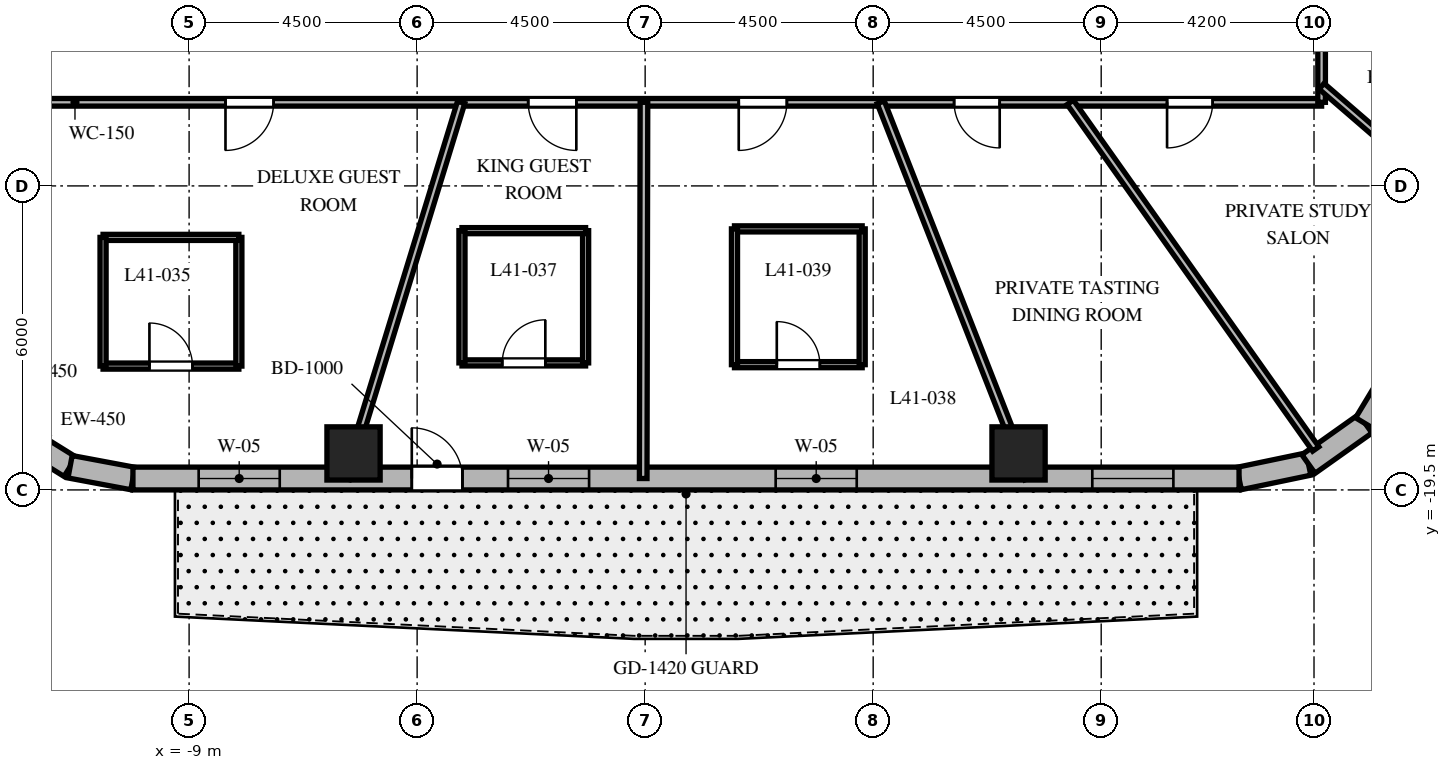
"""IFC4 building model, lengths in metres.
Left out: names, types, materials, properties, quantities, classifications, styles, units other than length and angle.
Written with IfcOpenShell. Run it as: python <this file> out.ifc"""

import sys

from ifc_helpers import new_model, si_unit, direction, frame, frame_2d, origin, origin_2d, place, context, subcontext, project, spatial, rectangle, extrude, element, fill, save


model = new_model("IFC4")
c1 = context("Model", 3, precision=1e-05, world=origin(), true_north=direction((0.0, 1.0)))
c2 = subcontext(c1, "Body", "Model", "MODEL_VIEW")
j1 = project(units=[si_unit("LENGTHUNIT", "METRE"), si_unit("PLANEANGLEUNIT", "RADIAN")], contexts=[c1])
p1 = place(None, origin())
s1 = spatial("IfcSite", under=j1, at=p1, CompositionType="ELEMENT")
p2 = place(p1, origin())
s2 = spatial("IfcBuilding", under=s1, at=p2, CompositionType="ELEMENT")
p3 = place(p2, frame((0.0, 0.0, 166.5)))
s3 = spatial("IfcBuildingStorey", under=s2, at=p3, CompositionType="ELEMENT", Elevation=166.5)
for number, where, z_axis, x_axis in (
    (1, (-5.755, -18.78, 0.0), (0.0, 0.0, 1.0), (1.0, 0.0, 0.0)),
    (2, (7.369, -18.78, 0.0), (0.0, 0.0, 1.0), (1.0, 0.0, 0.0)),
):
    element("IfcColumn", number, at=place(p3, frame(where, z_axis=z_axis, x_axis=x_axis)), inside=s3, PredefinedType="COLUMN", context=c2, shape_type="SweptSolid", body=[
        extrude(rectangle(XDim=1.05, YDim=1.05, at=origin_2d()), origin(), (0.0, 0.0, 1.0), 3.7),
    ])
p4 = place(p3, frame((-12.403, -18.389, 0.0), z_axis=(0.0, 0.0, 1.0), x_axis=(0.849795170926, -0.527113049991, 0.0)))
e3 = element("IfcWall", 3, at=p4, inside=s3, PredefinedType="SOLIDWALL", context=c2, shape_type="SweptSolid", body=[
    extrude(rectangle(XDim=1.241, YDim=0.45, at=frame_2d((0.62, 0.0))), origin(), (0.0, 0.0, 1.0), 3.38),
])
p5 = place(p3, frame((-11.349, -19.043, 0.0), z_axis=(0.0, 0.0, 1.0), x_axis=(0.982931267051, -0.183973161772, 0.0)))
e4 = element("IfcWall", 4, at=p5, inside=s3, PredefinedType="SOLIDWALL", context=c2, shape_type="SweptSolid", body=[
    extrude(rectangle(XDim=1.262, YDim=0.45, at=frame_2d((0.631, 0.0))), origin(), (0.0, 0.0, 1.0), 3.38),
])
p6 = place(p3, frame((11.72, -19.275, 0.0), z_axis=(0.0, 0.0, 1.0), x_axis=(0.97893106758, 0.204191001093, 0.0)))
e5 = element("IfcWall", 5, at=p6, inside=s3, PredefinedType="SOLIDWALL", context=c2, shape_type="SweptSolid", body=[
    extrude(rectangle(XDim=1.4, YDim=0.45, at=frame_2d((0.7, 0.0))), origin(), (0.0, 0.0, 1.0), 3.38),
])
p7 = place(p3, frame((13.091, -18.989, 0.0), z_axis=(0.0, 0.0, 1.0), x_axis=(0.815574637848, 0.578651890258, 0.0)))
e6 = element("IfcWall", 6, at=p7, inside=s3, PredefinedType="SOLIDWALL", context=c2, shape_type="SweptSolid", body=[
    extrude(rectangle(XDim=1.377, YDim=0.45, at=frame_2d((0.688, 0.0))), origin(), (0.0, 0.0, 1.0), 3.38),
])
p8 = place(p3, frame((14.214, -18.192, 0.0), z_axis=(0.0, 0.0, 1.0), x_axis=(0.516340945502, 0.856383108193, 0.0)))
e7 = element("IfcWall", 7, at=p8, inside=s3, PredefinedType="SOLIDWALL", context=c2, shape_type="SweptSolid", body=[
    extrude(rectangle(XDim=1.4, YDim=0.45, at=frame_2d((0.7, 0.0))), origin(), (0.0, 0.0, 1.0), 3.38),
])
p9 = place(p3, frame((-10.108, -19.275, 0.0), z_axis=(0.0, 0.0, 1.0), x_axis=(1.0, 0.0, 0.0)))
e8 = element("IfcWall", 8, at=p9, inside=s3, PredefinedType="SOLIDWALL", context=c2, shape_type="SweptSolid", body=[
    extrude(rectangle(XDim=21.829, YDim=0.45, at=frame_2d((10.915, 0.0))), origin(), (0.0, 0.0, 1.0), 3.38),
])
p10 = place(p9, frame((5.503, 0.0, 0.0)))
e9 = element("IfcOpeningElement", 9, at=p10, cuts=e8, PredefinedType="OPENING", context=c2, shape_type="SweptSolid", body=[
    extrude(rectangle(XDim=1.0, YDim=2.15, at=frame_2d((0.5, 1.075))), frame((0.0, 0.235, 0.0), z_axis=(0.0, -1.0, 0.0), x_axis=(1.0, 0.0, 0.0)), (0.0, 0.0, 1.0), 0.47),
])
p11 = place(p9, frame((1.297, 0.0, 0.8)))
e10 = element("IfcOpeningElement", 10, at=p11, cuts=e8, PredefinedType="OPENING", context=c2, shape_type="SweptSolid", body=[
    extrude(rectangle(XDim=1.6, YDim=1.75, at=frame_2d((0.8, 0.875))), frame((0.0, 0.235, 0.0), z_axis=(0.0, -1.0, 0.0), x_axis=(1.0, 0.0, 0.0)), (0.0, 0.0, 1.0), 0.47),
])
p12 = place(p9, frame((7.402, 0.0, 0.8)))
e11 = element("IfcOpeningElement", 11, at=p12, cuts=e8, PredefinedType="OPENING", context=c2, shape_type="SweptSolid", body=[
    extrude(rectangle(XDim=1.6, YDim=1.75, at=frame_2d((0.8, 0.875))), frame((0.0, 0.235, 0.0), z_axis=(0.0, -1.0, 0.0), x_axis=(1.0, 0.0, 0.0)), (0.0, 0.0, 1.0), 0.47),
])
p13 = place(p9, frame((12.684, 0.0, 0.8)))
e12 = element("IfcOpeningElement", 12, at=p13, cuts=e8, PredefinedType="OPENING", context=c2, shape_type="SweptSolid", body=[
    extrude(rectangle(XDim=1.6, YDim=1.75, at=frame_2d((0.8, 0.875))), frame((0.0, 0.235, 0.0), z_axis=(0.0, -1.0, 0.0), x_axis=(1.0, 0.0, 0.0)), (0.0, 0.0, 1.0), 0.47),
])
p14 = place(p9, frame((18.933, 0.0, 0.8)))
e13 = element("IfcOpeningElement", 13, at=p14, cuts=e8, PredefinedType="OPENING", context=c2, shape_type="SweptSolid", body=[
    extrude(rectangle(XDim=1.6, YDim=1.75, at=frame_2d((0.8, 0.875))), frame((0.0, 0.235, 0.0), z_axis=(0.0, -1.0, 0.0), x_axis=(1.0, 0.0, 0.0)), (0.0, 0.0, 1.0), 0.47),
])
p15 = place(p3, frame((13.35, -11.85, 0.0), z_axis=(0.0, 0.0, 1.0), x_axis=(-1.0, 0.0, 0.0)))
e14 = element("IfcWall", 14, at=p15, inside=s3, PredefinedType="PARTITIONING", context=c2, shape_type="SweptSolid", body=[
    extrude(rectangle(XDim=26.7, YDim=0.15, at=frame_2d((13.35, 0.0))), origin(), (0.0, 0.0, 1.0), 2.82),
])
p16 = place(p15, frame((20.682, 0.0, 0.0)))
e15 = element("IfcOpeningElement", 15, at=p16, cuts=e14, PredefinedType="OPENING", context=c2, shape_type="SweptSolid", body=[
    extrude(rectangle(XDim=0.95, YDim=2.03, at=frame_2d((0.475, 1.015))), frame((0.0, 0.085, 0.0), z_axis=(0.0, -1.0, 0.0), x_axis=(1.0, 0.0, 0.0)), (0.0, 0.0, 1.0), 0.17),
])
p17 = place(p15, frame((14.708, 0.0, 0.0)))
e16 = element("IfcOpeningElement", 16, at=p17, cuts=e14, PredefinedType="OPENING", context=c2, shape_type="SweptSolid", body=[
    extrude(rectangle(XDim=0.95, YDim=2.03, at=frame_2d((0.475, 1.015))), frame((0.0, 0.085, 0.0), z_axis=(0.0, -1.0, 0.0), x_axis=(1.0, 0.0, 0.0)), (0.0, 0.0, 1.0), 0.17),
])
p18 = place(p15, frame((10.553, 0.0, 0.0)))
e17 = element("IfcOpeningElement", 17, at=p18, cuts=e14, PredefinedType="OPENING", context=c2, shape_type="SweptSolid", body=[
    extrude(rectangle(XDim=0.95, YDim=2.03, at=frame_2d((0.475, 1.015))), frame((0.0, 0.085, 0.0), z_axis=(0.0, -1.0, 0.0), x_axis=(1.0, 0.0, 0.0)), (0.0, 0.0, 1.0), 0.17),
])
p19 = place(p15, frame((6.353, 0.0, 0.0)))
e18 = element("IfcOpeningElement", 18, at=p19, cuts=e14, PredefinedType="OPENING", context=c2, shape_type="SweptSolid", body=[
    extrude(rectangle(XDim=0.9, YDim=2.03, at=frame_2d((0.45, 1.015))), frame((0.0, 0.085, 0.0), z_axis=(0.0, -1.0, 0.0), x_axis=(1.0, 0.0, 0.0)), (0.0, 0.0, 1.0), 0.17),
])
p20 = place(p15, frame((2.15, 0.0, 0.0)))
e19 = element("IfcOpeningElement", 19, at=p20, cuts=e14, PredefinedType="OPENING", context=c2, shape_type="SweptSolid", body=[
    extrude(rectangle(XDim=0.9, YDim=2.03, at=frame_2d((0.45, 1.015))), frame((0.0, 0.085, 0.0), z_axis=(0.0, -1.0, 0.0), x_axis=(1.0, 0.0, 0.0)), (0.0, 0.0, 1.0), 0.17),
])
p21 = place(p3, frame((13.35, 11.85, 0.0), z_axis=(0.0, 0.0, 1.0), x_axis=(0.0, -1.0, 0.0)))
e20 = element("IfcWall", 20, at=p21, inside=s3, PredefinedType="PARTITIONING", context=c2, shape_type="SweptSolid", body=[
    extrude(rectangle(XDim=23.7, YDim=0.15, at=frame_2d((11.85, 0.0))), origin(), (0.0, 0.0, 1.0), 2.82),
])
p22 = place(p21, frame((5.652, 0.0, 0.0)))
e21 = element("IfcOpeningElement", 21, at=p22, cuts=e20, PredefinedType="OPENING", context=c2, shape_type="SweptSolid", body=[
    extrude(rectangle(XDim=0.95, YDim=2.03, at=frame_2d((0.475, 1.015))), frame((0.0, 0.085, 0.0), z_axis=(0.0, -1.0, 0.0), x_axis=(1.0, 0.0, 0.0)), (0.0, 0.0, 1.0), 0.17),
])
p23 = place(p21, frame((1.721, 0.0, 0.0)))
e22 = element("IfcOpeningElement", 22, at=p23, cuts=e20, PredefinedType="OPENING", context=c2, shape_type="SweptSolid", body=[
    extrude(rectangle(XDim=0.9, YDim=2.03, at=frame_2d((0.45, 1.015))), frame((0.0, 0.085, 0.0), z_axis=(0.0, -1.0, 0.0), x_axis=(1.0, 0.0, 0.0)), (0.0, 0.0, 1.0), 0.17),
])
p24 = place(p21, frame((18.389, 0.0, 0.0)))
e23 = element("IfcOpeningElement", 23, at=p24, cuts=e20, PredefinedType="OPENING", context=c2, shape_type="SweptSolid", body=[
    extrude(rectangle(XDim=0.95, YDim=2.03, at=frame_2d((0.475, 1.015))), frame((0.0, 0.085, 0.0), z_axis=(0.0, -1.0, 0.0), x_axis=(1.0, 0.0, 0.0)), (0.0, 0.0, 1.0), 0.17),
])
p25 = place(p21, frame((10.751, 0.0, 0.0)))
e24 = element("IfcOpeningElement", 24, at=p25, cuts=e20, PredefinedType="OPENING", context=c2, shape_type="SweptSolid", body=[
    extrude(rectangle(XDim=0.95, YDim=2.03, at=frame_2d((0.475, 1.015))), frame((0.0, 0.085, 0.0), z_axis=(0.0, -1.0, 0.0), x_axis=(1.0, 0.0, 0.0)), (0.0, 0.0, 1.0), 0.17),
])
p26 = place(p3, frame((-3.631, -11.85, 0.0), z_axis=(0.0, 0.0, 1.0), x_axis=(-0.293007573338, -0.956110120209, 0.0)))
e25 = element("IfcWall", 25, at=p26, inside=s3, PredefinedType="PARTITIONING", context=c2, shape_type="SweptSolid", body=[
    extrude(rectangle(XDim=7.766, YDim=0.15, at=frame_2d((3.883, 0.0))), origin(), (0.0, 0.0, 1.0), 2.62),
])
p27 = place(p3, frame((-0.024, -11.85, 0.0), z_axis=(0.0, 0.0, 1.0), x_axis=(-0.001972901592, -0.999998053828, 0.0)))
e26 = element("IfcWall", 26, at=p27, inside=s3, PredefinedType="PARTITIONING", context=c2, shape_type="SweptSolid", body=[
    extrude(rectangle(XDim=7.425, YDim=0.15, at=frame_2d((3.712, 0.0))), origin(), (0.0, 0.0, 1.0), 2.62),
])
p28 = place(p3, frame((4.65, -11.85, 0.0), z_axis=(0.0, 0.0, 1.0), x_axis=(0.365265947993, -0.930903210456, 0.0)))
e27 = element("IfcWall", 27, at=p28, inside=s3, PredefinedType="PARTITIONING", context=c2, shape_type="SweptSolid", body=[
    extrude(rectangle(XDim=7.976, YDim=0.15, at=frame_2d((3.988, 0.0))), origin(), (0.0, 0.0, 1.0), 2.62),
])
p29 = place(p3, frame((8.39, -11.85, 0.0), z_axis=(0.0, 0.0, 1.0), x_axis=(0.577877530264, -0.816123495566, 0.0)))
e28 = element("IfcWall", 28, at=p29, inside=s3, PredefinedType="PARTITIONING", context=c2, shape_type="SweptSolid", body=[
    extrude(rectangle(XDim=8.382, YDim=0.15, at=frame_2d((4.191, 0.0))), origin(), (0.0, 0.0, 1.0), 2.62),
])
p30 = place(p3, frame((13.35, -11.533, 0.0), z_axis=(0.0, 0.0, 1.0), x_axis=(0.756711647314, -0.65374879183, 0.0)))
e29 = element("IfcWall", 29, at=p30, inside=s3, PredefinedType="PARTITIONING", context=c2, shape_type="SweptSolid", body=[
    extrude(rectangle(XDim=3.55, YDim=0.15, at=frame_2d((1.775, 0.0))), origin(), (0.0, 0.0, 1.0), 2.62),
])
p31 = place(p3, frame((-10.698, -17.056, 0.0), z_axis=(0.0, 0.0, 1.0), x_axis=(1.0, 0.0, 0.0)))
e30 = element("IfcWall", 30, at=p31, inside=s3, PredefinedType="PARTITIONING", context=c2, shape_type="SweptSolid", body=[
    extrude(rectangle(XDim=2.68, YDim=0.12, at=frame_2d((1.34, 0.0))), origin(), (0.0, 0.0, 1.0), 2.62),
])
p32 = place(p31, frame((0.915, 0.0, 0.0)))
e31 = element("IfcOpeningElement", 31, at=p32, cuts=e30, PredefinedType="OPENING", context=c2, shape_type="SweptSolid", body=[
    extrude(rectangle(XDim=0.85, YDim=2.03, at=frame_2d((0.425, 1.015))), frame((0.0, 0.07, 0.0), z_axis=(0.0, -1.0, 0.0), x_axis=(1.0, 0.0, 0.0)), (0.0, 0.0, 1.0), 0.14),
])
p33 = place(p3, frame((-8.018, -17.056, 0.0), z_axis=(0.0, 0.0, 1.0), x_axis=(0.0, 1.0, 0.0)))
e32 = element("IfcWall", 32, at=p33, inside=s3, PredefinedType="PARTITIONING", context=c2, shape_type="SweptSolid", body=[
    extrude(rectangle(XDim=2.54, YDim=0.12, at=frame_2d((1.27, 0.0))), origin(), (0.0, 0.0, 1.0), 3.38),
])
p34 = place(p3, frame((-8.018, -14.516, 0.0), z_axis=(0.0, 0.0, 1.0), x_axis=(-1.0, 0.0, 0.0)))
e33 = element("IfcWall", 33, at=p34, inside=s3, PredefinedType="PARTITIONING", context=c2, shape_type="SweptSolid", body=[
    extrude(rectangle(XDim=2.68, YDim=0.12, at=frame_2d((1.34, 0.0))), origin(), (0.0, 0.0, 1.0), 3.38),
])
p35 = place(p3, frame((-10.698, -14.516, 0.0), z_axis=(0.0, 0.0, 1.0), x_axis=(0.0, -1.0, 0.0)))
e34 = element("IfcWall", 34, at=p35, inside=s3, PredefinedType="PARTITIONING", context=c2, shape_type="SweptSolid", body=[
    extrude(rectangle(XDim=2.54, YDim=0.12, at=frame_2d((1.27, 0.0))), origin(), (0.0, 0.0, 1.0), 2.62),
])
p36 = place(p3, frame((-3.615, -16.993, 0.0), z_axis=(0.0, 0.0, 1.0), x_axis=(1.0, 0.0, 0.0)))
e35 = element("IfcWall", 35, at=p36, inside=s3, PredefinedType="PARTITIONING", context=c2, shape_type="SweptSolid", body=[
    extrude(rectangle(XDim=2.44, YDim=0.12, at=frame_2d((1.22, 0.0))), origin(), (0.0, 0.0, 1.0), 3.38),
])
p37 = place(p36, frame((0.795, 0.0, 0.0)))
e36 = element("IfcOpeningElement", 36, at=p37, cuts=e35, PredefinedType="OPENING", context=c2, shape_type="SweptSolid", body=[
    extrude(rectangle(XDim=0.85, YDim=2.03, at=frame_2d((0.425, 1.015))), frame((0.0, 0.07, 0.0), z_axis=(0.0, -1.0, 0.0), x_axis=(1.0, 0.0, 0.0)), (0.0, 0.0, 1.0), 0.14),
])
p38 = place(p3, frame((-1.175, -16.993, 0.0), z_axis=(0.0, 0.0, 1.0), x_axis=(0.0, 1.0, 0.0)))
e37 = element("IfcWall", 37, at=p38, inside=s3, PredefinedType="PARTITIONING", context=c2, shape_type="SweptSolid", body=[
    extrude(rectangle(XDim=2.61, YDim=0.12, at=frame_2d((1.305, 0.0))), origin(), (0.0, 0.0, 1.0), 2.82),
])
p39 = place(p3, frame((-1.175, -14.383, 0.0), z_axis=(0.0, 0.0, 1.0), x_axis=(-1.0, 0.0, 0.0)))
e38 = element("IfcWall", 38, at=p39, inside=s3, PredefinedType="PARTITIONING", context=c2, shape_type="SweptSolid", body=[
    extrude(rectangle(XDim=2.44, YDim=0.12, at=frame_2d((1.22, 0.0))), origin(), (0.0, 0.0, 1.0), 3.38),
])
p40 = place(p3, frame((-3.615, -14.383, 0.0), z_axis=(0.0, 0.0, 1.0), x_axis=(0.0, -1.0, 0.0)))
e39 = element("IfcWall", 39, at=p40, inside=s3, PredefinedType="PARTITIONING", context=c2, shape_type="SweptSolid", body=[
    extrude(rectangle(XDim=2.61, YDim=0.12, at=frame_2d((1.305, 0.0))), origin(), (0.0, 0.0, 1.0), 2.82),
])
p41 = place(p3, frame((1.763, -17.028, 0.0), z_axis=(0.0, 0.0, 1.0), x_axis=(1.0, 0.0, 0.0)))
e40 = element("IfcWall", 40, at=p41, inside=s3, PredefinedType="PARTITIONING", context=c2, shape_type="SweptSolid", body=[
    extrude(rectangle(XDim=2.52, YDim=0.12, at=frame_2d((1.26, 0.0))), origin(), (0.0, 0.0, 1.0), 3.38),
])
p42 = place(p41, frame((0.835, 0.0, 0.0)))
e41 = element("IfcOpeningElement", 41, at=p42, cuts=e40, PredefinedType="OPENING", context=c2, shape_type="SweptSolid", body=[
    extrude(rectangle(XDim=0.85, YDim=2.03, at=frame_2d((0.425, 1.015))), frame((0.0, 0.07, 0.0), z_axis=(0.0, -1.0, 0.0), x_axis=(1.0, 0.0, 0.0)), (0.0, 0.0, 1.0), 0.14),
])
p43 = place(p3, frame((4.283, -17.028, 0.0), z_axis=(0.0, 0.0, 1.0), x_axis=(0.0, 1.0, 0.0)))
e42 = element("IfcWall", 42, at=p43, inside=s3, PredefinedType="PARTITIONING", context=c2, shape_type="SweptSolid", body=[
    extrude(rectangle(XDim=2.68, YDim=0.12, at=frame_2d((1.34, 0.0))), origin(), (0.0, 0.0, 1.0), 2.82),
])
p44 = place(p3, frame((4.283, -14.348, 0.0), z_axis=(0.0, 0.0, 1.0), x_axis=(-1.0, 0.0, 0.0)))
e43 = element("IfcWall", 43, at=p44, inside=s3, PredefinedType="PARTITIONING", context=c2, shape_type="SweptSolid", body=[
    extrude(rectangle(XDim=2.52, YDim=0.12, at=frame_2d((1.26, 0.0))), origin(), (0.0, 0.0, 1.0), 3.38),
])
p45 = place(p3, frame((1.763, -14.348, 0.0), z_axis=(0.0, 0.0, 1.0), x_axis=(0.0, -1.0, 0.0)))
e44 = element("IfcWall", 44, at=p45, inside=s3, PredefinedType="PARTITIONING", context=c2, shape_type="SweptSolid", body=[
    extrude(rectangle(XDim=2.68, YDim=0.12, at=frame_2d((1.34, 0.0))), origin(), (0.0, 0.0, 1.0), 2.82),
])
p46 = place(p10, origin())
e45 = element("IfcDoor", 45, at=p46, inside=s3, OperationType="SINGLE_SWING_LEFT", PredefinedType="DOOR", context=c2, shape_type="SweptSolid", body=[
    extrude(rectangle(XDim=1.0, YDim=2.15, at=frame_2d((0.5, 1.075))), frame((0.0, 0.025, 0.0), z_axis=(0.0, -1.0, 0.0), x_axis=(1.0, 0.0, 0.0)), (0.0, 0.0, 1.0), 0.05),
])
fill(e9, e45)
p47 = place(p11, origin())
e46 = element("IfcWindow", 46, at=p47, inside=s3, PartitioningType="SINGLE_PANEL", PredefinedType="WINDOW", context=c2, shape_type="SweptSolid", body=[
    extrude(rectangle(XDim=1.6, YDim=1.75, at=frame_2d((0.8, 0.875))), frame((0.0, 0.03, 0.0), z_axis=(0.0, -1.0, 0.0), x_axis=(1.0, 0.0, 0.0)), (0.0, 0.0, 1.0), 0.06),
])
fill(e10, e46)
p48 = place(p12, origin())
e47 = element("IfcWindow", 47, at=p48, inside=s3, PartitioningType="SINGLE_PANEL", PredefinedType="WINDOW", context=c2, shape_type="SweptSolid", body=[
    extrude(rectangle(XDim=1.6, YDim=1.75, at=frame_2d((0.8, 0.875))), frame((0.0, 0.03, 0.0), z_axis=(0.0, -1.0, 0.0), x_axis=(1.0, 0.0, 0.0)), (0.0, 0.0, 1.0), 0.06),
])
fill(e11, e47)
p49 = place(p13, origin())
e48 = element("IfcWindow", 48, at=p49, inside=s3, PartitioningType="SINGLE_PANEL", PredefinedType="WINDOW", context=c2, shape_type="SweptSolid", body=[
    extrude(rectangle(XDim=1.6, YDim=1.75, at=frame_2d((0.8, 0.875))), frame((0.0, 0.03, 0.0), z_axis=(0.0, -1.0, 0.0), x_axis=(1.0, 0.0, 0.0)), (0.0, 0.0, 1.0), 0.06),
])
fill(e12, e48)
p50 = place(p14, origin())
e49 = element("IfcWindow", 49, at=p50, inside=s3, PartitioningType="SINGLE_PANEL", PredefinedType="WINDOW", context=c2, shape_type="SweptSolid", body=[
    extrude(rectangle(XDim=1.6, YDim=1.75, at=frame_2d((0.8, 0.875))), frame((0.0, 0.03, 0.0), z_axis=(0.0, -1.0, 0.0), x_axis=(1.0, 0.0, 0.0)), (0.0, 0.0, 1.0), 0.06),
])
fill(e13, e49)
p51 = place(p16, origin())
e50 = element("IfcDoor", 50, at=p51, inside=s3, OperationType="SINGLE_SWING_RIGHT", PredefinedType="DOOR", context=c2, shape_type="SweptSolid", body=[
    extrude(rectangle(XDim=0.95, YDim=2.03, at=frame_2d((0.475, 1.015))), frame((0.0, 0.025, 0.0), z_axis=(0.0, -1.0, 0.0), x_axis=(1.0, 0.0, 0.0)), (0.0, 0.0, 1.0), 0.05),
])
fill(e15, e50)
p52 = place(p32, origin())
e51 = element("IfcDoor", 51, at=p52, inside=s3, OperationType="SINGLE_SWING_LEFT", PredefinedType="DOOR", context=c2, shape_type="SweptSolid", body=[
    extrude(rectangle(XDim=0.85, YDim=2.03, at=frame_2d((0.425, 1.015))), frame((0.0, 0.025, 0.0), z_axis=(0.0, -1.0, 0.0), x_axis=(1.0, 0.0, 0.0)), (0.0, 0.0, 1.0), 0.05),
])
fill(e31, e51)
p53 = place(p17, origin())
e52 = element("IfcDoor", 52, at=p53, inside=s3, OperationType="SINGLE_SWING_LEFT", PredefinedType="DOOR", context=c2, shape_type="SweptSolid", body=[
    extrude(rectangle(XDim=0.95, YDim=2.03, at=frame_2d((0.475, 1.015))), frame((0.0, 0.025, 0.0), z_axis=(0.0, -1.0, 0.0), x_axis=(1.0, 0.0, 0.0)), (0.0, 0.0, 1.0), 0.05),
])
fill(e16, e52)
p54 = place(p37, origin())
e53 = element("IfcDoor", 53, at=p54, inside=s3, OperationType="SINGLE_SWING_RIGHT", PredefinedType="DOOR", context=c2, shape_type="SweptSolid", body=[
    extrude(rectangle(XDim=0.85, YDim=2.03, at=frame_2d((0.425, 1.015))), frame((0.0, 0.025, 0.0), z_axis=(0.0, -1.0, 0.0), x_axis=(1.0, 0.0, 0.0)), (0.0, 0.0, 1.0), 0.05),
])
fill(e36, e53)
p55 = place(p18, origin())
e54 = element("IfcDoor", 54, at=p55, inside=s3, OperationType="SINGLE_SWING_RIGHT", PredefinedType="DOOR", context=c2, shape_type="SweptSolid", body=[
    extrude(rectangle(XDim=0.95, YDim=2.03, at=frame_2d((0.475, 1.015))), frame((0.0, 0.025, 0.0), z_axis=(0.0, -1.0, 0.0), x_axis=(1.0, 0.0, 0.0)), (0.0, 0.0, 1.0), 0.05),
])
fill(e17, e54)
p56 = place(p42, origin())
e55 = element("IfcDoor", 55, at=p56, inside=s3, OperationType="SINGLE_SWING_LEFT", PredefinedType="DOOR", context=c2, shape_type="SweptSolid", body=[
    extrude(rectangle(XDim=0.85, YDim=2.03, at=frame_2d((0.425, 1.015))), frame((0.0, 0.025, 0.0), z_axis=(0.0, -1.0, 0.0), x_axis=(1.0, 0.0, 0.0)), (0.0, 0.0, 1.0), 0.05),
])
fill(e41, e55)
p57 = place(p19, origin())
e56 = element("IfcDoor", 56, at=p57, inside=s3, OperationType="SINGLE_SWING_LEFT", PredefinedType="DOOR", context=c2, shape_type="SweptSolid", body=[
    extrude(rectangle(XDim=0.9, YDim=2.03, at=frame_2d((0.45, 1.015))), frame((0.0, 0.025, 0.0), z_axis=(0.0, -1.0, 0.0), x_axis=(1.0, 0.0, 0.0)), (0.0, 0.0, 1.0), 0.05),
])
fill(e18, e56)
p58 = place(p20, origin())
e57 = element("IfcDoor", 57, at=p58, inside=s3, OperationType="SINGLE_SWING_RIGHT", PredefinedType="DOOR", context=c2, shape_type="SweptSolid", body=[
    extrude(rectangle(XDim=0.9, YDim=2.03, at=frame_2d((0.45, 1.015))), frame((0.0, 0.025, 0.0), z_axis=(0.0, -1.0, 0.0), x_axis=(1.0, 0.0, 0.0)), (0.0, 0.0, 1.0), 0.05),
])
fill(e19, e57)
save(model, sys.argv[1])
